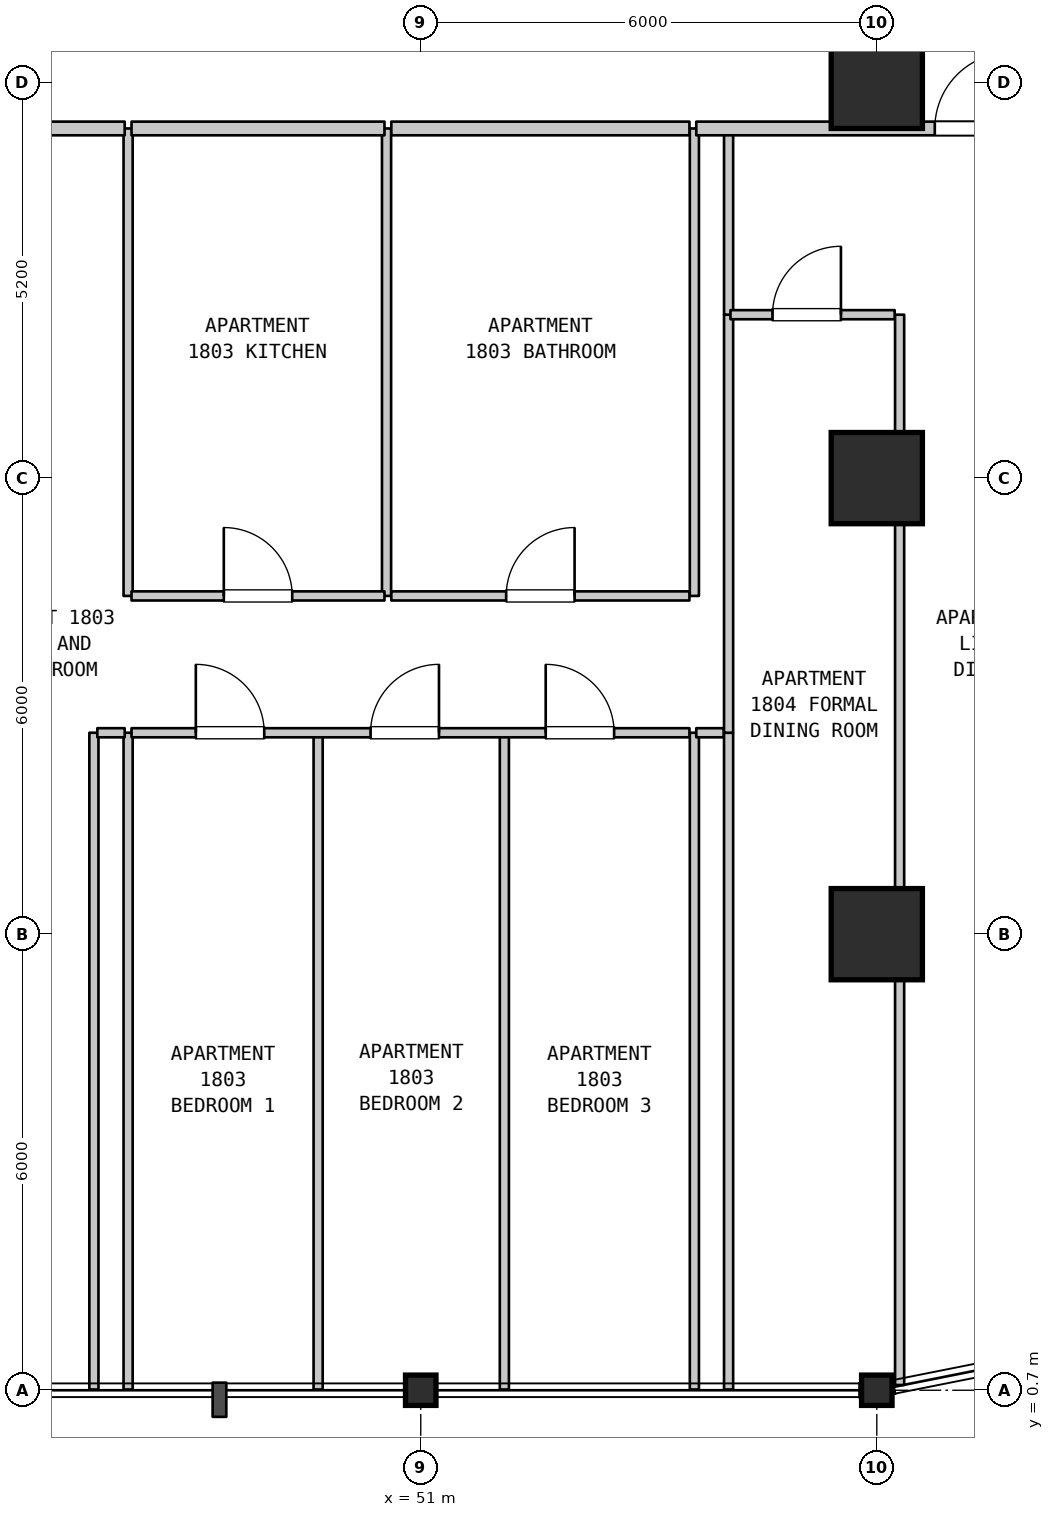
"""IFC4 building model, lengths in metres.
Left out: names, types, materials, properties, quantities, classifications, styles, units other than length and angle.
Written with IfcOpenShell. Run it as: python <this file> out.ifc"""

import sys

from ifc_helpers import new_model, si_unit, direction, frame, frame_2d, origin, origin_2d, place, context, subcontext, project, spatial, rectangle, i_section, extrude, element, fill, save


model = new_model("IFC4")
c1 = context("Model", 3, precision=1e-05, world=origin(), true_north=direction((0.0, 1.0)))
c2 = subcontext(c1, "Body", "Model", "MODEL_VIEW")
j1 = project(units=[si_unit("LENGTHUNIT", "METRE"), si_unit("PLANEANGLEUNIT", "RADIAN")], contexts=[c1])
p1 = place(None, origin())
s1 = spatial("IfcSite", under=j1, at=p1, CompositionType="ELEMENT")
p2 = place(p1, origin())
s2 = spatial("IfcBuilding", under=s1, at=p2, CompositionType="ELEMENT")
p3 = place(p2, frame((0.0, 0.0, 77.5)))
s3 = spatial("IfcBuildingStorey", under=s2, at=p3, CompositionType="ELEMENT", Elevation=77.5)
for number, where, z_axis, x_axis in (
    (1, (51.0, 0.7, 0.0), (0.0, 0.0, 1.0), (1.0, 0.0, 0.0)),
    (2, (57.0, 0.7, 0.0), (0.0, 0.0, 1.0), (1.0, 0.0, 0.0)),
):
    element("IfcColumn", number, at=place(p3, frame(where, z_axis=z_axis, x_axis=x_axis)), inside=s3, PredefinedType="COLUMN", context=c2, shape_type="SweptSolid", body=[
        extrude(i_section(OverallWidth=0.401, OverallDepth=0.399, WebThickness=0.025, FlangeThickness=0.04, FilletRadius=0.015, at=origin_2d()), origin(), (0.0, 0.0, 1.0), 3.7),
    ])
for number, where, z_axis, x_axis in (
    (3, (57.0, 6.7, 0.0), (0.0, 0.0, 1.0), (1.0, 0.0, 0.0)),
    (4, (57.0, 12.7, 0.0), (0.0, 0.0, 1.0), (1.0, 0.0, 0.0)),
    (5, (57.0, 17.9, 0.0), (0.0, 0.0, 1.0), (1.0, 0.0, 0.0)),
):
    element("IfcColumn", number, at=place(p3, frame(where, z_axis=z_axis, x_axis=x_axis)), inside=s3, PredefinedType="COLUMN", context=c2, shape_type="SweptSolid", body=[
        extrude(rectangle(XDim=1.2, YDim=1.2, at=origin_2d()), origin(), (0.0, 0.0, 1.0), 3.7),
    ])
for number, where, z_axis, x_axis in (
    (6, (46.7, 0.71, 0.0), (0.0, 0.0, 1.0), (0.0, 1.0, 0.0)),
    (7, (47.15, 0.71, 0.0), (0.0, 0.0, 1.0), (0.0, 1.0, 0.0)),
):
    element("IfcWall", number, at=place(p3, frame(where, z_axis=z_axis, x_axis=x_axis)), inside=s3, PredefinedType="PARTITIONING", context=c2, shape_type="SweptSolid", body=[
        extrude(rectangle(XDim=8.64, YDim=0.12, at=frame_2d((4.32, 0.0))), origin(), (0.0, 0.0, 1.0), 3.28),
    ])
p4 = place(p3, frame((47.15, 11.15, 0.0), z_axis=(0.0, 0.0, 1.0), x_axis=(0.0, 1.0, 0.0)))
e8 = element("IfcWall", 8, at=p4, inside=s3, PredefinedType="PARTITIONING", context=c2, shape_type="SweptSolid", body=[
    extrude(rectangle(XDim=6.15, YDim=0.12, at=frame_2d((3.075, 0.0))), origin(), (0.0, 0.0, 1.0), 3.28),
])
p5 = place(p3, frame((49.65, 0.71, 0.0), z_axis=(0.0, 0.0, 1.0), x_axis=(0.0, 1.0, 0.0)))
e9 = element("IfcWall", 9, at=p5, inside=s3, PredefinedType="PARTITIONING", context=c2, shape_type="SweptSolid", body=[
    extrude(rectangle(XDim=8.64, YDim=0.12, at=frame_2d((4.32, 0.0))), origin(), (0.0, 0.0, 1.0), 3.28),
])
p6 = place(p3, frame((50.55, 11.15, 0.0), z_axis=(0.0, 0.0, 1.0), x_axis=(0.0, 1.0, 0.0)))
e10 = element("IfcWall", 10, at=p6, inside=s3, PredefinedType="PARTITIONING", context=c2, shape_type="SweptSolid", body=[
    extrude(rectangle(XDim=6.15, YDim=0.12, at=frame_2d((3.075, 0.0))), origin(), (0.0, 0.0, 1.0), 3.28),
])
for number, where, z_axis, x_axis in (
    (11, (52.1, 0.71, 0.0), (0.0, 0.0, 1.0), (0.0, 1.0, 0.0)),
    (12, (54.6, 0.71, 0.0), (0.0, 0.0, 1.0), (0.0, 1.0, 0.0)),
):
    element("IfcWall", number, at=place(p3, frame(where, z_axis=z_axis, x_axis=x_axis)), inside=s3, PredefinedType="PARTITIONING", context=c2, shape_type="SweptSolid", body=[
        extrude(rectangle(XDim=8.64, YDim=0.12, at=frame_2d((4.32, 0.0))), origin(), (0.0, 0.0, 1.0), 3.28),
    ])
p7 = place(p3, frame((54.6, 11.15, 0.0), z_axis=(0.0, 0.0, 1.0), x_axis=(0.0, 1.0, 0.0)))
e13 = element("IfcWall", 13, at=p7, inside=s3, PredefinedType="PARTITIONING", context=c2, shape_type="SweptSolid", body=[
    extrude(rectangle(XDim=6.15, YDim=0.12, at=frame_2d((3.075, 0.0))), origin(), (0.0, 0.0, 1.0), 3.28),
])
p8 = place(p3, frame((55.05, 0.71, 0.0), z_axis=(0.0, 0.0, 1.0), x_axis=(0.0, 1.0, 0.0)))
e14 = element("IfcWall", 14, at=p8, inside=s3, PredefinedType="PARTITIONING", context=c2, shape_type="SweptSolid", body=[
    extrude(rectangle(XDim=8.64, YDim=0.12, at=frame_2d((4.32, 0.0))), origin(), (0.0, 0.0, 1.0), 3.28),
])
p9 = place(p3, frame((55.05, 9.35, 0.0), z_axis=(0.0, 0.0, 1.0), x_axis=(0.0, 1.0, 0.0)))
e15 = element("IfcWall", 15, at=p9, inside=s3, PredefinedType="PARTITIONING", context=c2, shape_type="SweptSolid", body=[
    extrude(rectangle(XDim=5.5, YDim=0.12, at=frame_2d((2.75, 0.0))), origin(), (0.0, 0.0, 1.0), 3.28),
])
p10 = place(p3, frame((55.05, 14.85, 0.0), z_axis=(0.0, 0.0, 1.0), x_axis=(0.0, 1.0, 0.0)))
e16 = element("IfcWall", 16, at=p10, inside=s3, PredefinedType="PARTITIONING", context=c2, shape_type="SweptSolid", body=[
    extrude(rectangle(XDim=2.45, YDim=0.12, at=frame_2d((1.225, 0.0))), origin(), (0.0, 0.0, 1.0), 3.28),
])
p11 = place(p3, frame((57.3, 0.769, 0.0), z_axis=(0.0, 0.0, 1.0), x_axis=(0.0, 1.0, 0.0)))
e17 = element("IfcWall", 17, at=p11, inside=s3, PredefinedType="PARTITIONING", context=c2, shape_type="SweptSolid", body=[
    extrude(rectangle(XDim=14.081, YDim=0.12, at=frame_2d((7.041, 0.0))), origin(), (0.0, 0.0, 1.0), 3.28),
])
p12 = place(p3, frame((46.745, 9.35, 0.0), z_axis=(0.0, 0.0, 1.0), x_axis=(1.0, 0.0, 0.0)))
e18 = element("IfcWall", 18, at=p12, inside=s3, PredefinedType="PARTITIONING", context=c2, shape_type="SweptSolid", body=[
    extrude(rectangle(XDim=0.36, YDim=0.12, at=frame_2d((0.18, 0.0))), origin(), (0.0, 0.0, 1.0), 3.28),
])
p13 = place(p3, frame((47.195, 9.35, 0.0), z_axis=(0.0, 0.0, 1.0), x_axis=(1.0, 0.0, 0.0)))
e19 = element("IfcWall", 19, at=p13, inside=s3, PredefinedType="PARTITIONING", context=c2, shape_type="SweptSolid", body=[
    extrude(rectangle(XDim=7.34, YDim=0.12, at=frame_2d((3.67, 0.0))), origin(), (0.0, 0.0, 1.0), 3.28),
])
p14 = place(p13, frame((0.846, 0.0, 0.0)))
e20 = element("IfcOpeningElement", 20, at=p14, cuts=e19, PredefinedType="OPENING", context=c2, shape_type="SweptSolid", body=[
    extrude(rectangle(XDim=0.9, YDim=2.15, at=frame_2d((0.45, 1.075))), frame((0.0, 0.07, 0.0), z_axis=(0.0, -1.0, 0.0), x_axis=(1.0, 0.0, 0.0)), (0.0, 0.0, 1.0), 0.14),
])
p15 = place(p13, frame((3.145, 0.0, 0.0)))
e21 = element("IfcOpeningElement", 21, at=p15, cuts=e19, PredefinedType="OPENING", context=c2, shape_type="SweptSolid", body=[
    extrude(rectangle(XDim=0.9, YDim=2.15, at=frame_2d((0.45, 1.075))), frame((0.0, 0.07, 0.0), z_axis=(0.0, -1.0, 0.0), x_axis=(1.0, 0.0, 0.0)), (0.0, 0.0, 1.0), 0.14),
])
p16 = place(p13, frame((5.449, 0.0, 0.0)))
e22 = element("IfcOpeningElement", 22, at=p16, cuts=e19, PredefinedType="OPENING", context=c2, shape_type="SweptSolid", body=[
    extrude(rectangle(XDim=0.9, YDim=2.15, at=frame_2d((0.45, 1.075))), frame((0.0, 0.07, 0.0), z_axis=(0.0, -1.0, 0.0), x_axis=(1.0, 0.0, 0.0)), (0.0, 0.0, 1.0), 0.14),
])
p17 = place(p3, frame((54.625, 9.35, 0.0), z_axis=(0.0, 0.0, 1.0), x_axis=(1.0, 0.0, 0.0)))
e23 = element("IfcWall", 23, at=p17, inside=s3, PredefinedType="PARTITIONING", context=c2, shape_type="SweptSolid", body=[
    extrude(rectangle(XDim=0.36, YDim=0.12, at=frame_2d((0.18, 0.0))), origin(), (0.0, 0.0, 1.0), 3.28),
])
p18 = place(p3, frame((47.195, 11.15, 0.0), z_axis=(0.0, 0.0, 1.0), x_axis=(1.0, 0.0, 0.0)))
e24 = element("IfcWall", 24, at=p18, inside=s3, PredefinedType="PARTITIONING", context=c2, shape_type="SweptSolid", body=[
    extrude(rectangle(XDim=3.328, YDim=0.12, at=frame_2d((1.664, 0.0))), origin(), (0.0, 0.0, 1.0), 3.28),
])
p19 = place(p18, frame((1.214, 0.0, 0.0)))
e25 = element("IfcOpeningElement", 25, at=p19, cuts=e24, PredefinedType="OPENING", context=c2, shape_type="SweptSolid", body=[
    extrude(rectangle(XDim=0.9, YDim=2.15, at=frame_2d((0.45, 1.075))), frame((0.0, 0.07, 0.0), z_axis=(0.0, -1.0, 0.0), x_axis=(1.0, 0.0, 0.0)), (0.0, 0.0, 1.0), 0.14),
])
p20 = place(p3, frame((50.613, 11.15, 0.0), z_axis=(0.0, 0.0, 1.0), x_axis=(1.0, 0.0, 0.0)))
e26 = element("IfcWall", 26, at=p20, inside=s3, PredefinedType="PARTITIONING", context=c2, shape_type="SweptSolid", body=[
    extrude(rectangle(XDim=3.922, YDim=0.12, at=frame_2d((1.961, 0.0))), origin(), (0.0, 0.0, 1.0), 3.28),
])
p21 = place(p20, frame((1.511, 0.0, 0.0)))
e27 = element("IfcOpeningElement", 27, at=p21, cuts=e26, PredefinedType="OPENING", context=c2, shape_type="SweptSolid", body=[
    extrude(rectangle(XDim=0.9, YDim=2.1, at=frame_2d((0.45, 1.05))), frame((0.0, 0.07, 0.0), z_axis=(0.0, -1.0, 0.0), x_axis=(1.0, 0.0, 0.0)), (0.0, 0.0, 1.0), 0.14),
])
p22 = place(p3, frame((55.075, 14.85, 0.0), z_axis=(0.0, 0.0, 1.0), x_axis=(1.0, 0.0, 0.0)))
e28 = element("IfcWall", 28, at=p22, inside=s3, PredefinedType="PARTITIONING", context=c2, shape_type="SweptSolid", body=[
    extrude(rectangle(XDim=2.16, YDim=0.12, at=frame_2d((1.08, 0.0))), origin(), (0.0, 0.0, 1.0), 3.28),
])
p23 = place(p22, frame((0.553, 0.0, 0.0)))
e29 = element("IfcOpeningElement", 29, at=p23, cuts=e28, PredefinedType="OPENING", context=c2, shape_type="SweptSolid", body=[
    extrude(rectangle(XDim=0.9, YDim=2.15, at=frame_2d((0.45, 1.075))), frame((0.0, 0.07, 0.0), z_axis=(0.0, -1.0, 0.0), x_axis=(1.0, 0.0, 0.0)), (0.0, 0.0, 1.0), 0.14),
])
p24 = place(p3, frame((41.805, 17.3, 0.0), z_axis=(0.0, 0.0, 1.0), x_axis=(1.0, 0.0, 0.0)))
e30 = element("IfcWall", 30, at=p24, inside=s3, PredefinedType="STANDARD", context=c2, shape_type="SweptSolid", body=[
    extrude(rectangle(XDim=5.3, YDim=0.18, at=frame_2d((2.65, 0.0))), origin(), (0.0, 0.0, 1.0), 3.28),
])
p25 = place(p24, frame((2.35, 0.0, 0.0)))
e31 = element("IfcOpeningElement", 31, at=p25, cuts=e30, PredefinedType="OPENING", context=c2, shape_type="SweptSolid", body=[
    extrude(rectangle(XDim=1.0, YDim=2.15, at=frame_2d((0.5, 1.075))), frame((0.0, 0.1, 0.0), z_axis=(0.0, -1.0, 0.0), x_axis=(1.0, 0.0, 0.0)), (0.0, 0.0, 1.0), 0.2),
])
p26 = place(p3, frame((47.195, 17.3, 0.0), z_axis=(0.0, 0.0, 1.0), x_axis=(1.0, 0.0, 0.0)))
e32 = element("IfcWall", 32, at=p26, inside=s3, PredefinedType="STANDARD", context=c2, shape_type="SweptSolid", body=[
    extrude(rectangle(XDim=3.328, YDim=0.18, at=frame_2d((1.664, 0.0))), origin(), (0.0, 0.0, 1.0), 3.28),
])
p27 = place(p3, frame((50.613, 17.3, 0.0), z_axis=(0.0, 0.0, 1.0), x_axis=(1.0, 0.0, 0.0)))
e33 = element("IfcWall", 33, at=p27, inside=s3, PredefinedType="STANDARD", context=c2, shape_type="SweptSolid", body=[
    extrude(rectangle(XDim=3.922, YDim=0.18, at=frame_2d((1.961, 0.0))), origin(), (0.0, 0.0, 1.0), 3.28),
])
p28 = place(p3, frame((54.625, 17.3, 0.0), z_axis=(0.0, 0.0, 1.0), x_axis=(1.0, 0.0, 0.0)))
e34 = element("IfcWall", 34, at=p28, inside=s3, PredefinedType="STANDARD", context=c2, shape_type="SweptSolid", body=[
    extrude(rectangle(XDim=5.545, YDim=0.18, at=frame_2d((2.772, 0.0))), origin(), (0.0, 0.0, 1.0), 3.28),
])
p29 = place(p28, frame((3.138, 0.0, 0.0)))
e35 = element("IfcOpeningElement", 35, at=p29, cuts=e34, PredefinedType="OPENING", context=c2, shape_type="SweptSolid", body=[
    extrude(rectangle(XDim=1.0, YDim=2.15, at=frame_2d((0.5, 1.075))), frame((0.0, 0.1, 0.0), z_axis=(0.0, -1.0, 0.0), x_axis=(1.0, 0.0, 0.0)), (0.0, 0.0, 1.0), 0.2),
])
p30 = place(p14, origin())
e36 = element("IfcDoor", 36, at=p30, inside=s3, OperationType="SINGLE_SWING_LEFT", PredefinedType="DOOR", context=c2, shape_type="SweptSolid", body=[
    extrude(rectangle(XDim=0.9, YDim=2.15, at=frame_2d((0.45, 1.075))), frame((0.0, 0.025, 0.0), z_axis=(0.0, -1.0, 0.0), x_axis=(1.0, 0.0, 0.0)), (0.0, 0.0, 1.0), 0.05),
])
fill(e20, e36)
p31 = place(p15, origin())
e37 = element("IfcDoor", 37, at=p31, inside=s3, OperationType="SINGLE_SWING_RIGHT", PredefinedType="DOOR", context=c2, shape_type="SweptSolid", body=[
    extrude(rectangle(XDim=0.9, YDim=2.15, at=frame_2d((0.45, 1.075))), frame((0.0, 0.025, 0.0), z_axis=(0.0, -1.0, 0.0), x_axis=(1.0, 0.0, 0.0)), (0.0, 0.0, 1.0), 0.05),
])
fill(e21, e37)
p32 = place(p16, origin())
e38 = element("IfcDoor", 38, at=p32, inside=s3, OperationType="SINGLE_SWING_LEFT", PredefinedType="DOOR", context=c2, shape_type="SweptSolid", body=[
    extrude(rectangle(XDim=0.9, YDim=2.15, at=frame_2d((0.45, 1.075))), frame((0.0, 0.025, 0.0), z_axis=(0.0, -1.0, 0.0), x_axis=(1.0, 0.0, 0.0)), (0.0, 0.0, 1.0), 0.05),
])
fill(e22, e38)
p33 = place(p19, origin())
e39 = element("IfcDoor", 39, at=p33, inside=s3, OperationType="SINGLE_SWING_LEFT", PredefinedType="DOOR", context=c2, shape_type="SweptSolid", body=[
    extrude(rectangle(XDim=0.9, YDim=2.15, at=frame_2d((0.45, 1.075))), frame((0.0, 0.025, 0.0), z_axis=(0.0, -1.0, 0.0), x_axis=(1.0, 0.0, 0.0)), (0.0, 0.0, 1.0), 0.05),
])
fill(e25, e39)
p34 = place(p21, origin())
e40 = element("IfcDoor", 40, at=p34, inside=s3, OperationType="SINGLE_SWING_RIGHT", PredefinedType="DOOR", context=c2, shape_type="SweptSolid", body=[
    extrude(rectangle(XDim=0.9, YDim=2.1, at=frame_2d((0.45, 1.05))), frame((0.0, 0.025, 0.0), z_axis=(0.0, -1.0, 0.0), x_axis=(1.0, 0.0, 0.0)), (0.0, 0.0, 1.0), 0.05),
])
fill(e27, e40)
p35 = place(p23, origin())
e41 = element("IfcDoor", 41, at=p35, inside=s3, OperationType="SINGLE_SWING_RIGHT", PredefinedType="DOOR", context=c2, shape_type="SweptSolid", body=[
    extrude(rectangle(XDim=0.9, YDim=2.15, at=frame_2d((0.45, 1.075))), frame((0.0, 0.025, 0.0), z_axis=(0.0, -1.0, 0.0), x_axis=(1.0, 0.0, 0.0)), (0.0, 0.0, 1.0), 0.05),
])
fill(e29, e41)
p36 = place(p29, origin())
e42 = element("IfcDoor", 42, at=p36, inside=s3, OperationType="SINGLE_SWING_RIGHT", PredefinedType="DOOR", context=c2, shape_type="SweptSolid", body=[
    extrude(rectangle(XDim=1.0, YDim=2.15, at=frame_2d((0.5, 1.075))), frame((0.0, 0.025, 0.0), z_axis=(0.0, -1.0, 0.0), x_axis=(1.0, 0.0, 0.0)), (0.0, 0.0, 1.0), 0.05),
])
fill(e35, e42)
save(model, sys.argv[1])
